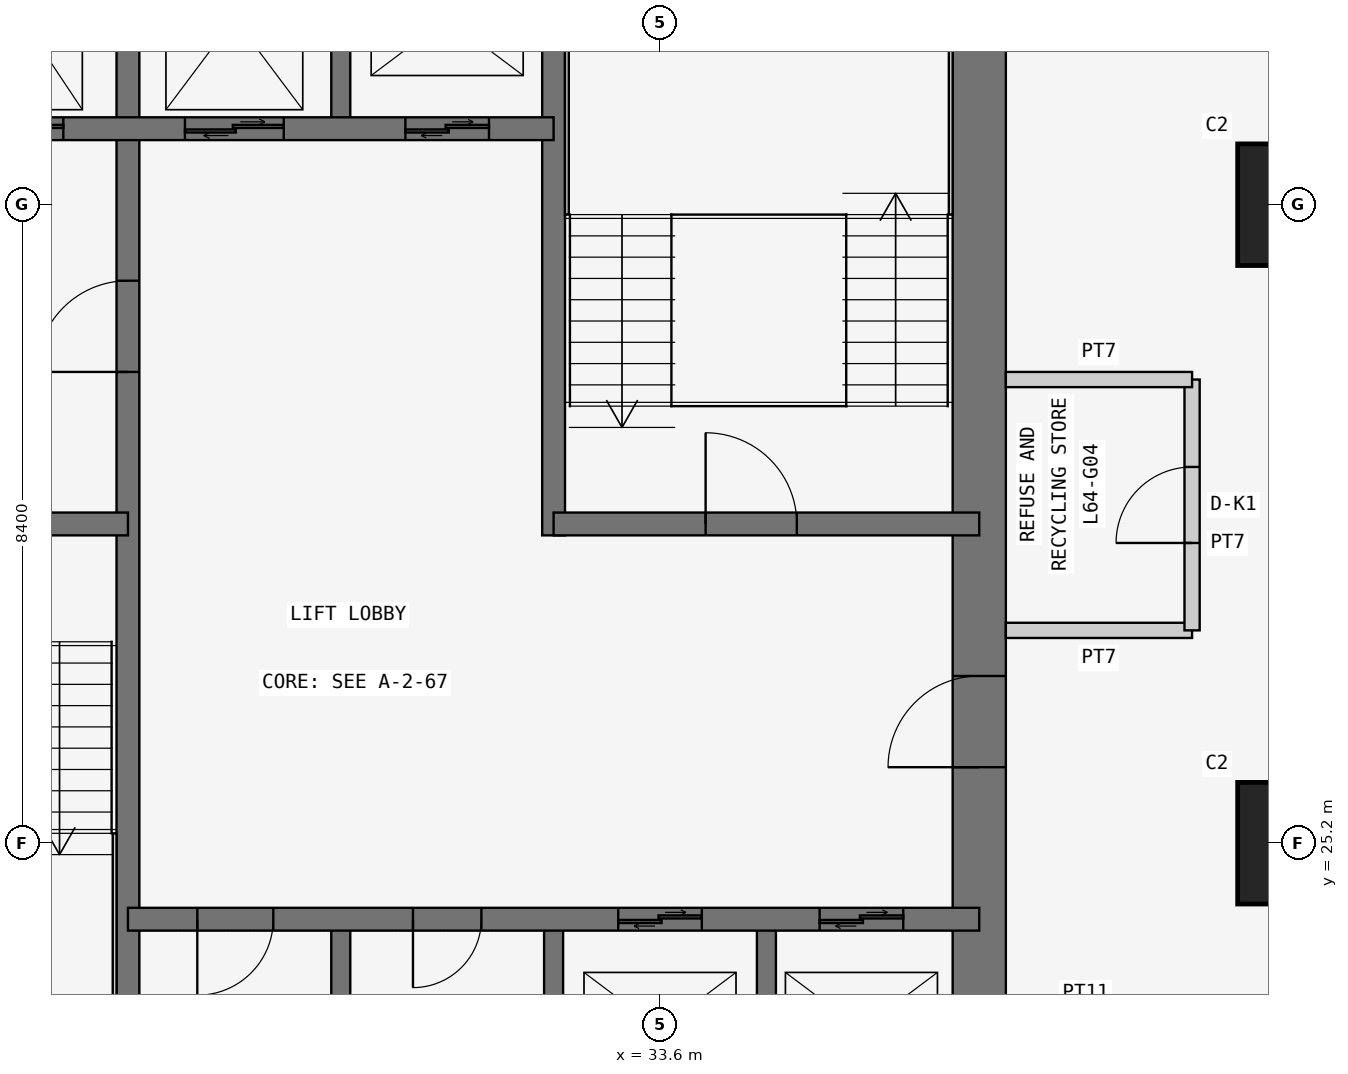
"""IFC4 building model, lengths in metres.
Left out: names, types, materials, properties, quantities, classifications, styles, units other than length and angle.
Written with IfcOpenShell. Run it as: python <this file> out.ifc"""

import sys

from ifc_helpers import new_model, si_unit, direction, frame, frame_2d, origin, origin_2d, place, context, subcontext, project, spatial, rectangle, extrude, element, fill, save


model = new_model("IFC4")
c1 = context("Model", 3, precision=1e-05, world=origin(), true_north=direction((0.0, 1.0)))
c2 = subcontext(c1, "Body", "Model", "MODEL_VIEW")
j1 = project(units=[si_unit("LENGTHUNIT", "METRE"), si_unit("PLANEANGLEUNIT", "RADIAN")], contexts=[c1])
p1 = place(None, origin())
s1 = spatial("IfcSite", under=j1, at=p1, CompositionType="ELEMENT")
p2 = place(p1, origin())
s2 = spatial("IfcBuilding", under=s1, at=p2, CompositionType="ELEMENT")
p3 = place(p2, frame((0.0, 0.0, 244.5)))
s3 = spatial("IfcBuildingStorey", under=s2, at=p3, CompositionType="ELEMENT", Elevation=244.5)
for number, where, z_axis, x_axis in (
    (1, (42.0, 25.2, 0.0), (0.0, 0.0, 1.0), (1.0, 0.0, 0.0)),
    (2, (42.0, 33.6, 0.0), (0.0, 0.0, 1.0), (1.0, 0.0, 0.0)),
):
    element("IfcColumn", number, at=place(p3, frame(where, z_axis=z_axis, x_axis=x_axis)), inside=s3, PredefinedType="COLUMN", context=c2, shape_type="SweptSolid", body=[
        extrude(rectangle(XDim=1.6, YDim=1.6, at=origin_2d()), origin(), (0.0, 0.0, 1.0), 3.6),
    ])
p4 = place(p3, frame((37.8, 21.0, 0.0), z_axis=(0.0, 0.0, 1.0), x_axis=(0.0, 1.0, 0.0)))
e3 = element("IfcWall", 3, at=p4, inside=s3, PredefinedType="SHEAR", context=c2, shape_type="SweptSolid", body=[
    extrude(rectangle(XDim=17.15, YDim=0.7, at=frame_2d((8.575, 0.0))), origin(), (0.0, 0.0, 1.0), 3.6),
])
p5 = place(p4, frame((5.2, 0.0, 0.0)))
e4 = element("IfcOpeningElement", 4, at=p5, cuts=e3, PredefinedType="OPENING", context=c2, shape_type="SweptSolid", body=[
    extrude(rectangle(XDim=1.2, YDim=2.1, at=frame_2d((0.6, 1.05))), frame((0.0, 0.36, 0.0), z_axis=(0.0, -1.0, 0.0), x_axis=(1.0, 0.0, 0.0)), (0.0, 0.0, 1.0), 0.72),
])
p6 = place(p3, frame((26.6, 21.0, 0.0), z_axis=(0.0, 0.0, 1.0), x_axis=(0.0, 1.0, 0.0)))
e5 = element("IfcWall", 5, at=p6, inside=s3, PredefinedType="SHEAR", context=c2, shape_type="SweptSolid", body=[
    extrude(rectangle(XDim=16.8, YDim=0.3, at=frame_2d((8.4, 0.0))), origin(), (0.0, 0.0, 1.0), 3.6),
])
p7 = place(p6, frame((10.4, 0.0, 0.0)))
e6 = element("IfcOpeningElement", 6, at=p7, cuts=e5, PredefinedType="OPENING", context=c2, shape_type="SweptSolid", body=[
    extrude(rectangle(XDim=1.2, YDim=2.1, at=frame_2d((0.6, 1.05))), frame((0.0, 0.16, 0.0), z_axis=(0.0, -1.0, 0.0), x_axis=(1.0, 0.0, 0.0)), (0.0, 0.0, 1.0), 0.32),
])
p8 = place(p3, frame((21.0, 29.4, 0.0), z_axis=(0.0, 0.0, 1.0), x_axis=(1.0, 0.0, 0.0)))
e7 = element("IfcWall", 7, at=p8, inside=s3, PredefinedType="SHEAR", context=c2, shape_type="SweptSolid", body=[
    extrude(rectangle(XDim=5.6, YDim=0.3, at=frame_2d((2.8, 0.0))), origin(), (0.0, 0.0, 1.0), 3.6),
])
p9 = place(p8, frame((2.3, 0.0, 0.0)))
e8 = element("IfcOpeningElement", 8, at=p9, cuts=e7, PredefinedType="OPENING", context=c2, shape_type="SweptSolid", body=[
    extrude(rectangle(XDim=1.2, YDim=2.1, at=frame_2d((0.6, 1.05))), frame((0.0, 0.16, 0.0), z_axis=(0.0, -1.0, 0.0), x_axis=(1.0, 0.0, 0.0)), (0.0, 0.0, 1.0), 0.32),
])
p10 = place(p3, frame((21.0, 34.6, 0.0), z_axis=(0.0, 0.0, 1.0), x_axis=(1.0, 0.0, 0.0)))
e9 = element("IfcWall", 9, at=p10, inside=s3, PredefinedType="SHEAR", context=c2, shape_type="SweptSolid", body=[
    extrude(rectangle(XDim=11.2, YDim=0.3, at=frame_2d((5.6, 0.0))), origin(), (0.0, 0.0, 1.0), 3.6),
])
p11 = place(p10, frame((9.25, 0.0, 0.0)))
e10 = element("IfcOpeningElement", 10, at=p11, cuts=e9, PredefinedType="OPENING", context=c2, shape_type="SweptSolid", body=[
    extrude(rectangle(XDim=1.1, YDim=2.1, at=frame_2d((0.55, 1.05))), frame((0.0, 0.16, 0.0), z_axis=(0.0, -1.0, 0.0), x_axis=(1.0, 0.0, 0.0)), (0.0, 0.0, 1.0), 0.32),
])
p12 = place(p10, frame((1.0, 0.0, 0.0)))
e11 = element("IfcOpeningElement", 11, at=p12, cuts=e9, PredefinedType="OPENING", context=c2, shape_type="SweptSolid", body=[
    extrude(rectangle(XDim=1.1, YDim=2.1, at=frame_2d((0.55, 1.05))), frame((0.0, 0.16, 0.0), z_axis=(0.0, -1.0, 0.0), x_axis=(1.0, 0.0, 0.0)), (0.0, 0.0, 1.0), 0.32),
])
p13 = place(p10, frame((3.65, 0.0, 0.0)))
e12 = element("IfcOpeningElement", 12, at=p13, cuts=e9, PredefinedType="OPENING", context=c2, shape_type="SweptSolid", body=[
    extrude(rectangle(XDim=1.1, YDim=2.1, at=frame_2d((0.55, 1.05))), frame((0.0, 0.16, 0.0), z_axis=(0.0, -1.0, 0.0), x_axis=(1.0, 0.0, 0.0)), (0.0, 0.0, 1.0), 0.32),
])
p14 = place(p10, frame((6.35, 0.0, 0.0)))
e13 = element("IfcOpeningElement", 13, at=p14, cuts=e9, PredefinedType="OPENING", context=c2, shape_type="SweptSolid", body=[
    extrude(rectangle(XDim=1.3, YDim=2.1, at=frame_2d((0.65, 1.05))), frame((0.0, 0.16, 0.0), z_axis=(0.0, -1.0, 0.0), x_axis=(1.0, 0.0, 0.0)), (0.0, 0.0, 1.0), 0.32),
])
p15 = place(p3, frame((26.6, 24.2, 0.0), z_axis=(0.0, 0.0, 1.0), x_axis=(1.0, 0.0, 0.0)))
e14 = element("IfcWall", 14, at=p15, inside=s3, PredefinedType="SHEAR", context=c2, shape_type="SweptSolid", body=[
    extrude(rectangle(XDim=11.2, YDim=0.3, at=frame_2d((5.6, 0.0))), origin(), (0.0, 0.0, 1.0), 3.6),
])
p16 = place(p15, frame((0.913, 0.0, 0.0)))
e15 = element("IfcOpeningElement", 15, at=p16, cuts=e14, PredefinedType="OPENING", context=c2, shape_type="SweptSolid", body=[
    extrude(rectangle(XDim=1.0, YDim=2.1, at=frame_2d((0.5, 1.05))), frame((0.0, 0.16, 0.0), z_axis=(0.0, -1.0, 0.0), x_axis=(1.0, 0.0, 0.0)), (0.0, 0.0, 1.0), 0.32),
])
p17 = place(p15, frame((3.75, 0.0, 0.0)))
e16 = element("IfcOpeningElement", 16, at=p17, cuts=e14, PredefinedType="OPENING", context=c2, shape_type="SweptSolid", body=[
    extrude(rectangle(XDim=0.9, YDim=2.1, at=frame_2d((0.45, 1.05))), frame((0.0, 0.16, 0.0), z_axis=(0.0, -1.0, 0.0), x_axis=(1.0, 0.0, 0.0)), (0.0, 0.0, 1.0), 0.32),
])
p18 = place(p15, frame((6.45, 0.0, 0.0)))
e17 = element("IfcOpeningElement", 17, at=p18, cuts=e14, PredefinedType="OPENING", context=c2, shape_type="SweptSolid", body=[
    extrude(rectangle(XDim=1.1, YDim=2.1, at=frame_2d((0.55, 1.05))), frame((0.0, 0.16, 0.0), z_axis=(0.0, -1.0, 0.0), x_axis=(1.0, 0.0, 0.0)), (0.0, 0.0, 1.0), 0.32),
])
p19 = place(p15, frame((9.1, 0.0, 0.0)))
e18 = element("IfcOpeningElement", 18, at=p19, cuts=e14, PredefinedType="OPENING", context=c2, shape_type="SweptSolid", body=[
    extrude(rectangle(XDim=1.1, YDim=2.1, at=frame_2d((0.55, 1.05))), frame((0.0, 0.16, 0.0), z_axis=(0.0, -1.0, 0.0), x_axis=(1.0, 0.0, 0.0)), (0.0, 0.0, 1.0), 0.32),
])
p20 = place(p3, frame((32.2, 29.25, 0.0), z_axis=(0.0, 0.0, 1.0), x_axis=(0.0, 1.0, 0.0)))
e19 = element("IfcWall", 19, at=p20, inside=s3, PredefinedType="SHEAR", context=c2, shape_type="SweptSolid", body=[
    extrude(rectangle(XDim=8.55, YDim=0.3, at=frame_2d((4.275, 0.0))), origin(), (0.0, 0.0, 1.0), 3.6),
])
p21 = place(p3, frame((32.2, 29.4, 0.0), z_axis=(0.0, 0.0, 1.0), x_axis=(1.0, 0.0, 0.0)))
e20 = element("IfcWall", 20, at=p21, inside=s3, PredefinedType="SHEAR", context=c2, shape_type="SweptSolid", body=[
    extrude(rectangle(XDim=5.6, YDim=0.3, at=frame_2d((2.8, 0.0))), origin(), (0.0, 0.0, 1.0), 3.6),
])
p22 = place(p21, frame((2.0, 0.0, 0.0)))
e21 = element("IfcOpeningElement", 21, at=p22, cuts=e20, PredefinedType="OPENING", context=c2, shape_type="SweptSolid", body=[
    extrude(rectangle(XDim=1.2, YDim=2.1, at=frame_2d((0.6, 1.05))), frame((0.0, 0.16, 0.0), z_axis=(0.0, -1.0, 0.0), x_axis=(1.0, 0.0, 0.0)), (0.0, 0.0, 1.0), 0.32),
])
for number, where, z_axis, x_axis in (
    (22, (29.4, 21.0, 0.0), (0.0, 0.0, 1.0), (0.0, 1.0, 0.0)),
    (23, (32.2, 21.0, 0.0), (0.0, 0.0, 1.0), (0.0, 1.0, 0.0)),
    (24, (35.0, 21.0, 0.0), (0.0, 0.0, 1.0), (0.0, 1.0, 0.0)),
    (25, (29.4, 34.6, 0.0), (0.0, 0.0, 1.0), (0.0, 1.0, 0.0)),
):
    element("IfcWall", number, at=place(p3, frame(where, z_axis=z_axis, x_axis=x_axis)), inside=s3, PredefinedType="SHEAR", context=c2, shape_type="SweptSolid", body=[
        extrude(rectangle(XDim=3.2, YDim=0.25, at=frame_2d((1.6, 0.0))), origin(), (0.0, 0.0, 1.0), 3.6),
    ])
p23 = place(p3, frame((38.15, 28.0, 0.0), z_axis=(0.0, 0.0, 1.0), x_axis=(1.0, 0.0, 0.0)))
e26 = element("IfcWall", 26, at=p23, inside=s3, PredefinedType="PARTITIONING", context=c2, shape_type="SweptSolid", body=[
    extrude(rectangle(XDim=2.45, YDim=0.2, at=frame_2d((1.225, 0.0))), origin(), (0.0, 0.0, 1.0), 3.35),
])
p24 = place(p3, frame((40.6, 28.0, 0.0), z_axis=(0.0, 0.0, 1.0), x_axis=(0.0, 1.0, 0.0)))
e27 = element("IfcWall", 27, at=p24, inside=s3, PredefinedType="PARTITIONING", context=c2, shape_type="SweptSolid", body=[
    extrude(rectangle(XDim=3.3, YDim=0.2, at=frame_2d((1.65, 0.0))), origin(), (0.0, 0.0, 1.0), 3.35),
])
p25 = place(p24, frame((1.15, 0.0, 0.0)))
e28 = element("IfcOpeningElement", 28, at=p25, cuts=e27, PredefinedType="OPENING", context=c2, shape_type="SweptSolid", body=[
    extrude(rectangle(XDim=1.0, YDim=2.1, at=frame_2d((0.5, 1.05))), frame((0.0, 0.11, 0.0), z_axis=(0.0, -1.0, 0.0), x_axis=(1.0, 0.0, 0.0)), (0.0, 0.0, 1.0), 0.22),
])
p26 = place(p3, frame((40.6, 31.3, 0.0), z_axis=(0.0, 0.0, 1.0), x_axis=(-1.0, 0.0, 0.0)))
e29 = element("IfcWall", 29, at=p26, inside=s3, PredefinedType="PARTITIONING", context=c2, shape_type="SweptSolid", body=[
    extrude(rectangle(XDim=2.45, YDim=0.2, at=frame_2d((1.225, 0.0))), origin(), (0.0, 0.0, 1.0), 3.35),
])
p27 = place(p3, frame((26.425, 25.33, 1.8), z_axis=(0.0, 0.0, 1.0), x_axis=(0.0, -1.0, 0.0)))
e30 = element("IfcWall", 30, at=p27, inside=s3, PredefinedType="PARTITIONING", context=c2, shape_type="SweptSolid", body=[
    extrude(rectangle(XDim=3.93, YDim=0.05, at=frame_2d((1.965, 0.0))), origin(), (0.0, 0.0, 1.0), 1.8),
])
for number, where, z_axis, x_axis in (
    (31, (32.375, 33.47, 1.8), (0.0, 0.0, 1.0), (0.0, 1.0, 0.0)),
    (32, (37.425, 33.47, 1.8), (0.0, 0.0, 1.0), (0.0, 1.0, 0.0)),
):
    element("IfcWall", number, at=place(p3, frame(where, z_axis=z_axis, x_axis=x_axis)), inside=s3, PredefinedType="PARTITIONING", context=c2, shape_type="SweptSolid", body=[
        extrude(rectangle(XDim=3.93, YDim=0.05, at=frame_2d((1.965, 0.0))), origin(), (0.0, 0.0, 1.0), 1.8),
    ])
p28 = place(p25, origin())
e33 = element("IfcDoor", 33, at=p28, inside=s3, OperationType="SINGLE_SWING_LEFT", PredefinedType="DOOR", context=c2, shape_type="SweptSolid", body=[
    extrude(rectangle(XDim=1.0, YDim=2.1, at=frame_2d((0.5, 1.05))), frame((0.0, 0.025, 0.0), z_axis=(0.0, -1.0, 0.0), x_axis=(1.0, 0.0, 0.0)), (0.0, 0.0, 1.0), 0.05),
])
fill(e28, e33)
p29 = place(p7, origin())
e34 = element("IfcDoor", 34, at=p29, inside=s3, OperationType="SINGLE_SWING_LEFT", PredefinedType="DOOR", context=c2, shape_type="SweptSolid", body=[
    extrude(rectangle(XDim=1.2, YDim=2.1, at=frame_2d((0.6, 1.05))), frame((0.0, 0.025, 0.0), z_axis=(0.0, -1.0, 0.0), x_axis=(1.0, 0.0, 0.0)), (0.0, 0.0, 1.0), 0.05),
])
fill(e6, e34)
p30 = place(p5, origin())
e35 = element("IfcDoor", 35, at=p30, inside=s3, OperationType="SINGLE_SWING_LEFT", PredefinedType="DOOR", context=c2, shape_type="SweptSolid", body=[
    extrude(rectangle(XDim=1.2, YDim=2.1, at=frame_2d((0.6, 1.05))), frame((0.0, 0.025, 0.0), z_axis=(0.0, -1.0, 0.0), x_axis=(1.0, 0.0, 0.0)), (0.0, 0.0, 1.0), 0.05),
])
fill(e4, e35)
p31 = place(p22, origin())
e36 = element("IfcDoor", 36, at=p31, inside=s3, OperationType="SINGLE_SWING_LEFT", PredefinedType="DOOR", context=c2, shape_type="SweptSolid", body=[
    extrude(rectangle(XDim=1.2, YDim=2.1, at=frame_2d((0.6, 1.05))), frame((0.0, 0.025, 0.0), z_axis=(0.0, -1.0, 0.0), x_axis=(1.0, 0.0, 0.0)), (0.0, 0.0, 1.0), 0.05),
])
fill(e21, e36)
p32 = place(p16, frame((1.0, 0.0, 0.0), z_axis=(0.0, 0.0, 1.0), x_axis=(-1.0, 0.0, 0.0)))
e37 = element("IfcDoor", 37, at=p32, inside=s3, OperationType="SINGLE_SWING_RIGHT", PredefinedType="DOOR", context=c2, shape_type="SweptSolid", body=[
    extrude(rectangle(XDim=1.0, YDim=2.1, at=frame_2d((0.5, 1.05))), frame((0.0, 0.025, 0.0), z_axis=(0.0, -1.0, 0.0), x_axis=(1.0, 0.0, 0.0)), (0.0, 0.0, 1.0), 0.05),
])
fill(e15, e37)
p33 = place(p17, frame((0.9, 0.0, 0.0), z_axis=(0.0, 0.0, 1.0), x_axis=(-1.0, 0.0, 0.0)))
e38 = element("IfcDoor", 38, at=p33, inside=s3, OperationType="SINGLE_SWING_RIGHT", PredefinedType="DOOR", context=c2, shape_type="SweptSolid", body=[
    extrude(rectangle(XDim=0.9, YDim=2.1, at=frame_2d((0.45, 1.05))), frame((0.0, 0.025, 0.0), z_axis=(0.0, -1.0, 0.0), x_axis=(1.0, 0.0, 0.0)), (0.0, 0.0, 1.0), 0.05),
])
fill(e16, e38)
p34 = place(p18, origin())
e39 = element("IfcDoor", 39, at=p34, inside=s3, OperationType="DOUBLE_DOOR_SLIDING", PredefinedType="DOOR", context=c2, shape_type="SweptSolid", body=[
    extrude(rectangle(XDim=1.1, YDim=2.1, at=frame_2d((0.55, 1.05))), frame((0.0, 0.025, 0.0), z_axis=(0.0, -1.0, 0.0), x_axis=(1.0, 0.0, 0.0)), (0.0, 0.0, 1.0), 0.05),
])
fill(e17, e39)
p35 = place(p19, origin())
e40 = element("IfcDoor", 40, at=p35, inside=s3, OperationType="DOUBLE_DOOR_SLIDING", PredefinedType="DOOR", context=c2, shape_type="SweptSolid", body=[
    extrude(rectangle(XDim=1.1, YDim=2.1, at=frame_2d((0.55, 1.05))), frame((0.0, 0.025, 0.0), z_axis=(0.0, -1.0, 0.0), x_axis=(1.0, 0.0, 0.0)), (0.0, 0.0, 1.0), 0.05),
])
fill(e18, e40)
p36 = place(p11, origin())
e41 = element("IfcDoor", 41, at=p36, inside=s3, OperationType="DOUBLE_DOOR_SLIDING", PredefinedType="DOOR", context=c2, shape_type="SweptSolid", body=[
    extrude(rectangle(XDim=1.1, YDim=2.1, at=frame_2d((0.55, 1.05))), frame((0.0, 0.025, 0.0), z_axis=(0.0, -1.0, 0.0), x_axis=(1.0, 0.0, 0.0)), (0.0, 0.0, 1.0), 0.05),
])
fill(e10, e41)
p37 = place(p13, origin())
e42 = element("IfcDoor", 42, at=p37, inside=s3, OperationType="DOUBLE_DOOR_SLIDING", PredefinedType="DOOR", context=c2, shape_type="SweptSolid", body=[
    extrude(rectangle(XDim=1.1, YDim=2.1, at=frame_2d((0.55, 1.05))), frame((0.0, 0.025, 0.0), z_axis=(0.0, -1.0, 0.0), x_axis=(1.0, 0.0, 0.0)), (0.0, 0.0, 1.0), 0.05),
])
fill(e12, e42)
p38 = place(p14, origin())
e43 = element("IfcDoor", 43, at=p38, inside=s3, OperationType="DOUBLE_DOOR_SLIDING", PredefinedType="DOOR", context=c2, shape_type="SweptSolid", body=[
    extrude(rectangle(XDim=1.3, YDim=2.1, at=frame_2d((0.65, 1.05))), frame((0.0, 0.025, 0.0), z_axis=(0.0, -1.0, 0.0), x_axis=(1.0, 0.0, 0.0)), (0.0, 0.0, 1.0), 0.05),
])
fill(e13, e43)
save(model, sys.argv[1])
